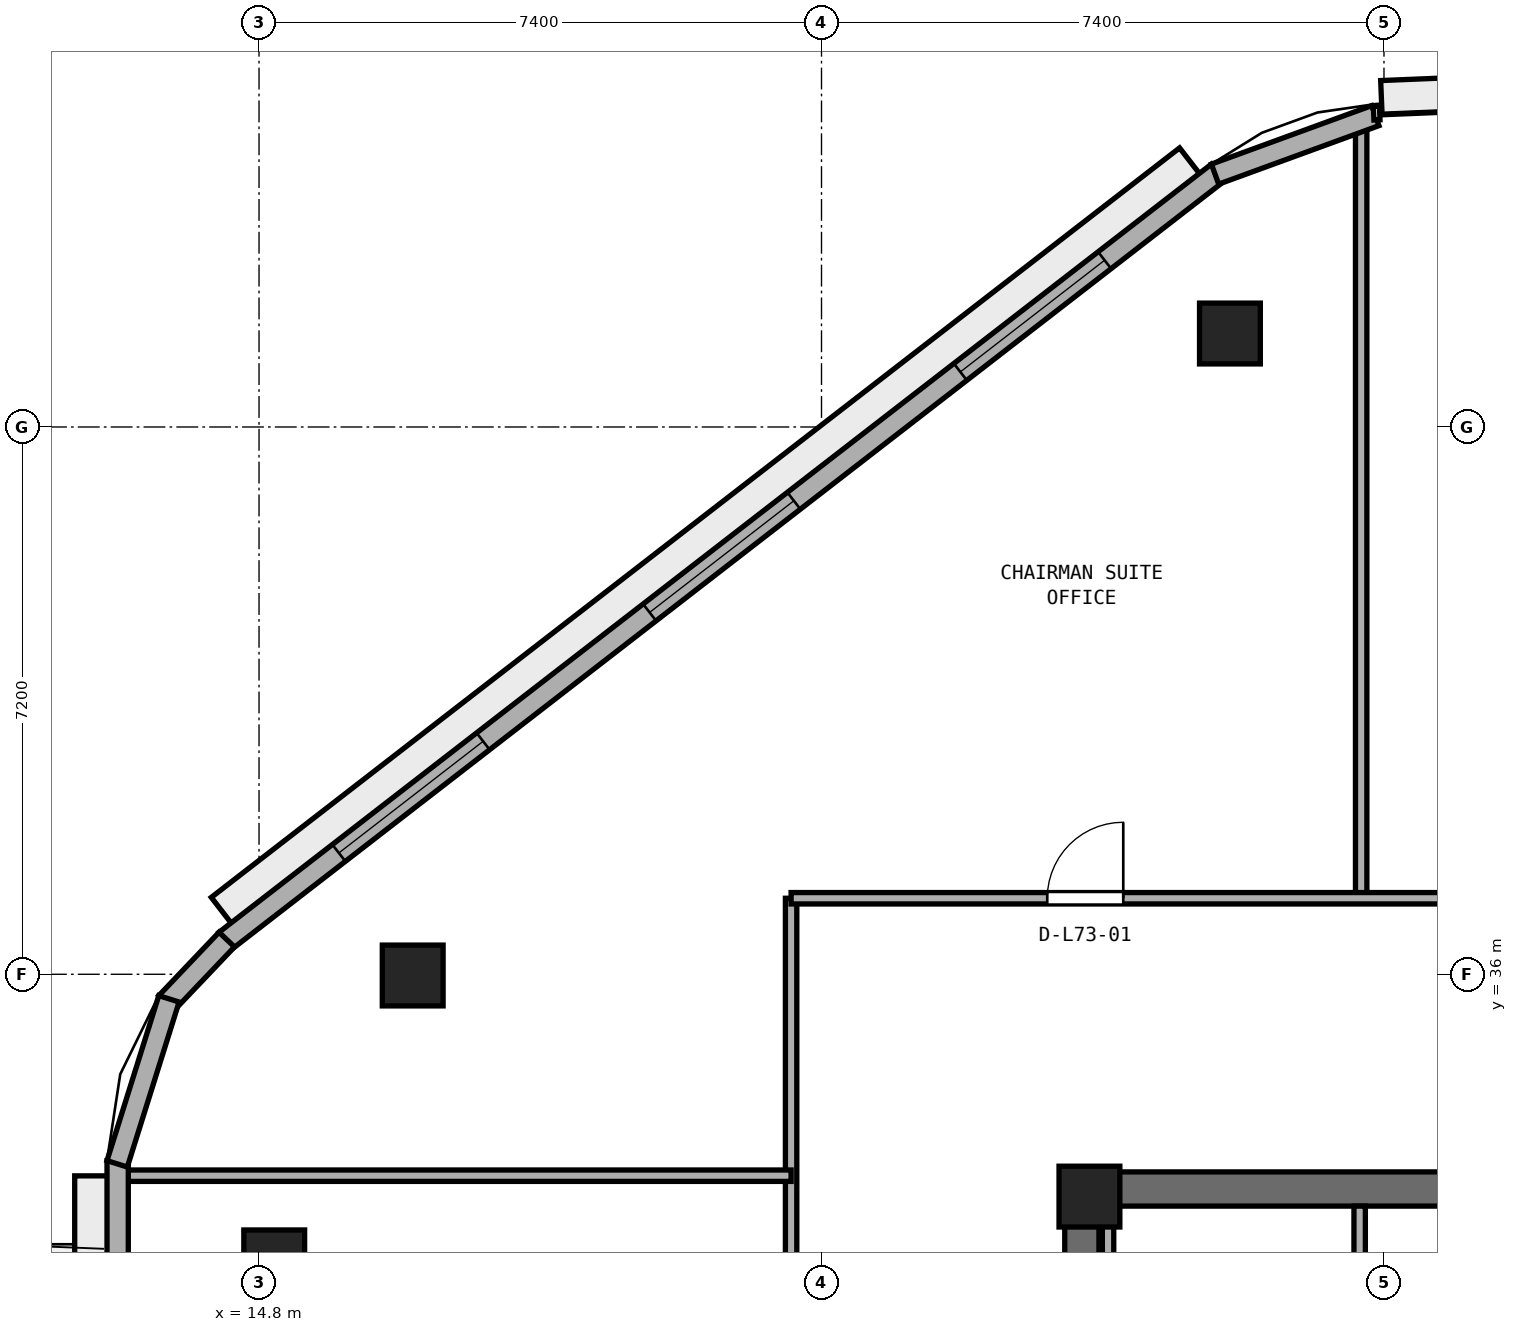
"""IFC4 building model, lengths in metres.
Left out: names, types, materials, properties, quantities, classifications, styles, units other than length and angle.
Written with IfcOpenShell. Run it as: python <this file> out.ifc"""

import sys

from ifc_helpers import new_model, si_unit, direction, frame, frame_2d, origin, origin_2d, place, context, subcontext, project, spatial, rectangle, extrude, element, fill, save


model = new_model("IFC4")
c1 = context("Model", 3, precision=1e-05, world=origin(), true_north=direction((0.0, 1.0)))
c2 = subcontext(c1, "Body", "Model", "MODEL_VIEW")
j1 = project(units=[si_unit("LENGTHUNIT", "METRE"), si_unit("PLANEANGLEUNIT", "RADIAN")], contexts=[c1])
p1 = place(None, origin())
s1 = spatial("IfcSite", under=j1, at=p1, CompositionType="ELEMENT")
p2 = place(p1, origin())
s2 = spatial("IfcBuilding", under=s1, at=p2, CompositionType="ELEMENT")
p3 = place(p2, frame((0.0, 0.0, 285.8)))
s3 = spatial("IfcBuildingStorey", under=s2, at=p3, CompositionType="ELEMENT", Elevation=285.8)
p4 = place(p3, frame((25.4, 33.175, 0.0), z_axis=(0.0, 0.0, 1.0), x_axis=(1.0, 0.0, 0.0)))
e1 = element("IfcWall", 1, at=p4, inside=s3, PredefinedType="SHEAR", context=c2, shape_type="SweptSolid", body=[
    extrude(rectangle(XDim=23.2, YDim=0.45, at=frame_2d((11.6, 0.0))), origin(), (0.0, 0.0, 1.0), 3.54),
])
p5 = place(p3, frame((25.625, 17.45, 0.0), z_axis=(0.0, 0.0, 1.0), x_axis=(0.0, 1.0, 0.0)))
e2 = element("IfcWall", 2, at=p5, inside=s3, PredefinedType="SHEAR", context=c2, shape_type="SweptSolid", body=[
    extrude(rectangle(XDim=15.5, YDim=0.45, at=frame_2d((7.75, 0.0))), origin(), (0.0, 0.0, 1.0), 3.54),
])
p6 = place(p5, frame((7.0, 0.0, 0.0)))
e3 = element("IfcOpeningElement", 3, at=p6, cuts=e2, PredefinedType="OPENING", context=c2, shape_type="SweptSolid", body=[
    extrude(rectangle(XDim=1.5, YDim=2.15, at=frame_2d((0.75, 1.075))), frame((0.0, 0.235, 0.0), z_axis=(0.0, -1.0, 0.0), x_axis=(1.0, 0.0, 0.0)), (0.0, 0.0, 1.0), 0.47),
])
p7 = place(p3, frame((25.725, 33.075, 0.0), z_axis=(0.0, 0.0, 1.0), x_axis=(1.0, 0.0, 0.0)))
e4 = element("IfcColumn", 4, at=p7, inside=s3, PredefinedType="PILASTER", context=c2, shape_type="SweptSolid", body=[
    extrude(rectangle(XDim=0.8, YDim=0.8, at=origin_2d()), origin(), (0.0, 0.0, 1.0), 3.8),
])
for number, where, z_axis, x_axis in (
    (5, (27.573, 44.43, 0.0), (0.0, 0.0, 1.0), (1.0, 0.0, 0.0)),
    (6, (16.822, 35.984, 0.0), (0.0, 0.0, 1.0), (1.0, 0.0, 0.0)),
    (7, (15.0, 32.236, 0.0), (0.0, 0.0, 1.0), (1.0, 0.0, 0.0)),
):
    element("IfcColumn", number, at=place(p3, frame(where, z_axis=z_axis, x_axis=x_axis)), inside=s3, PredefinedType="COLUMN", context=c2, shape_type="SweptSolid", body=[
        extrude(rectangle(XDim=0.8, YDim=0.8, at=origin_2d()), origin(), (0.0, 0.0, 1.0), 3.8),
    ])
p8 = place(p3, frame((25.97, 30.65, 0.0), z_axis=(0.0, 0.0, 1.0), x_axis=(0.0, 1.0, 0.0)))
e8 = element("IfcWall", 8, at=p8, inside=s3, PredefinedType="PARTITIONING", context=c2, shape_type="SweptSolid", body=[
    extrude(rectangle(XDim=2.3, YDim=0.15, at=frame_2d((1.15, 0.0))), origin(), (0.0, 0.0, 1.0), 2.64),
])
p9 = place(p3, frame((29.28, 30.65, 0.0), z_axis=(0.0, 0.0, 1.0), x_axis=(0.0, 1.0, 0.0)))
e9 = element("IfcWall", 9, at=p9, inside=s3, PredefinedType="PARTITIONING", context=c2, shape_type="SweptSolid", body=[
    extrude(rectangle(XDim=2.3, YDim=0.15, at=frame_2d((1.15, 0.0))), origin(), (0.0, 0.0, 1.0), 3.54),
])
p10 = place(p3, frame((29.3, 37.0, 0.0), z_axis=(0.0, 0.0, 1.0), x_axis=(0.0, 1.0, 0.0)))
e10 = element("IfcWall", 10, at=p10, inside=s3, PredefinedType="PARTITIONING", context=c2, shape_type="SweptSolid", body=[
    extrude(rectangle(XDim=10.216, YDim=0.15, at=frame_2d((5.108, 0.0))), origin(), (0.0, 0.0, 1.0), 3.54),
])
p11 = place(p3, frame((21.8, 7.79, 0.0), z_axis=(0.0, 0.0, 1.0), x_axis=(0.0, 1.0, 0.0)))
e11 = element("IfcWall", 11, at=p11, inside=s3, PredefinedType="PARTITIONING", context=c2, shape_type="SweptSolid", body=[
    extrude(rectangle(XDim=29.21, YDim=0.15, at=frame_2d((14.605, 0.0))), origin(), (0.0, 0.0, 1.0), 3.54),
])
p12 = place(p11, frame((9.76, 0.0, 0.0)))
e12 = element("IfcOpeningElement", 12, at=p12, cuts=e11, PredefinedType="OPENING", context=c2, shape_type="SweptSolid", body=[
    extrude(rectangle(XDim=0.9, YDim=2.1, at=frame_2d((0.45, 1.05))), frame((0.0, 0.085, 0.0), z_axis=(0.0, -1.0, 0.0), x_axis=(1.0, 0.0, 0.0)), (0.0, 0.0, 1.0), 0.17),
])
p13 = place(p11, frame((18.11, 0.0, 0.0)))
e13 = element("IfcOpeningElement", 13, at=p13, cuts=e11, PredefinedType="OPENING", context=c2, shape_type="SweptSolid", body=[
    extrude(rectangle(XDim=0.9, YDim=2.1, at=frame_2d((0.45, 1.05))), frame((0.0, 0.085, 0.0), z_axis=(0.0, -1.0, 0.0), x_axis=(1.0, 0.0, 0.0)), (0.0, 0.0, 1.0), 0.17),
])
p14 = place(p11, frame((23.485, 0.0, 0.0)))
e14 = element("IfcOpeningElement", 14, at=p14, cuts=e11, PredefinedType="OPENING", context=c2, shape_type="SweptSolid", body=[
    extrude(rectangle(XDim=0.9, YDim=2.1, at=frame_2d((0.45, 1.05))), frame((0.0, 0.085, 0.0), z_axis=(0.0, -1.0, 0.0), x_axis=(1.0, 0.0, 0.0)), (0.0, 0.0, 1.0), 0.17),
])
p15 = place(p3, frame((13.005, 33.35, 0.0), z_axis=(0.0, 0.0, 1.0), x_axis=(1.0, 0.0, 0.0)))
e15 = element("IfcWall", 15, at=p15, inside=s3, PredefinedType="PARTITIONING", context=c2, shape_type="SweptSolid", body=[
    extrude(rectangle(XDim=8.795, YDim=0.15, at=frame_2d((4.397, 0.0))), origin(), (0.0, 0.0, 1.0), 3.54),
])
p16 = place(p3, frame((21.8, 37.0, 0.0), z_axis=(0.0, 0.0, 1.0), x_axis=(1.0, 0.0, 0.0)))
e16 = element("IfcWall", 16, at=p16, inside=s3, PredefinedType="PARTITIONING", context=c2, shape_type="SweptSolid", body=[
    extrude(rectangle(XDim=13.85, YDim=0.15, at=frame_2d((6.925, 0.0))), origin(), (0.0, 0.0, 1.0), 3.54),
])
p17 = place(p16, frame((3.37, 0.0, 0.0)))
e17 = element("IfcOpeningElement", 17, at=p17, cuts=e16, PredefinedType="OPENING", context=c2, shape_type="SweptSolid", body=[
    extrude(rectangle(XDim=1.0, YDim=2.12, at=frame_2d((0.5, 1.06))), frame((0.0, 0.085, 0.0), z_axis=(0.0, -1.0, 0.0), x_axis=(1.0, 0.0, 0.0)), (0.0, 0.0, 1.0), 0.17),
])
p18 = place(p3, frame((27.415, 46.547, 0.0), z_axis=(0.0, 0.0, 1.0), x_axis=(-0.790789745248, -0.612087884875, 0.0)))
e18 = element("IfcWall", 18, at=p18, inside=s3, PredefinedType="STANDARD", context=c2, shape_type="SweptSolid", body=[
    extrude(rectangle(XDim=16.509, YDim=0.28, at=frame_2d((8.254, 0.0))), origin(), (0.0, 0.0, 1.0), 3.54),
])
p19 = place(p18, frame((1.885, 0.0, 0.9)))
e19 = element("IfcOpeningElement", 19, at=p19, cuts=e18, PredefinedType="OPENING", context=c2, shape_type="SweptSolid", body=[
    extrude(rectangle(XDim=2.4, YDim=1.75, at=frame_2d((1.2, 0.875))), frame((0.0, 0.15, 0.0), z_axis=(0.0, -1.0, 0.0), x_axis=(1.0, 0.0, 0.0)), (0.0, 0.0, 1.0), 0.3),
])
p20 = place(p18, frame((7.055, 0.0, 0.9)))
e20 = element("IfcOpeningElement", 20, at=p20, cuts=e18, PredefinedType="OPENING", context=c2, shape_type="SweptSolid", body=[
    extrude(rectangle(XDim=2.4, YDim=1.75, at=frame_2d((1.2, 0.875))), frame((0.0, 0.15, 0.0), z_axis=(0.0, -1.0, 0.0), x_axis=(1.0, 0.0, 0.0)), (0.0, 0.0, 1.0), 0.3),
])
p21 = place(p18, frame((12.224, 0.0, 0.9)))
e21 = element("IfcOpeningElement", 21, at=p21, cuts=e18, PredefinedType="OPENING", context=c2, shape_type="SweptSolid", body=[
    extrude(rectangle(XDim=2.4, YDim=1.75, at=frame_2d((1.2, 0.875))), frame((0.0, 0.15, 0.0), z_axis=(0.0, -1.0, 0.0), x_axis=(1.0, 0.0, 0.0)), (0.0, 0.0, 1.0), 0.3),
])
p22 = place(p3, frame((12.94, 33.548, 0.0), z_axis=(0.0, 0.0, 1.0), x_axis=(0.0, -1.0, 0.0)))
e22 = element("IfcWall", 22, at=p22, inside=s3, PredefinedType="STANDARD", context=c2, shape_type="SweptSolid", body=[
    extrude(rectangle(XDim=17.496, YDim=0.28, at=frame_2d((8.748, 0.0))), origin(), (0.0, 0.0, 1.0), 3.54),
])
p23 = place(p22, frame((8.198, 0.0, 0.0)))
e23 = element("IfcOpeningElement", 23, at=p23, cuts=e22, PredefinedType="OPENING", context=c2, shape_type="SweptSolid", body=[
    extrude(rectangle(XDim=1.1, YDim=2.2, at=frame_2d((0.55, 1.1))), frame((0.0, 0.15, 0.0), z_axis=(0.0, -1.0, 0.0), x_axis=(1.0, 0.0, 0.0)), (0.0, 0.0, 1.0), 0.3),
])
p24 = place(p22, frame((13.047, 0.0, 0.9)))
e24 = element("IfcOpeningElement", 24, at=p24, cuts=e22, PredefinedType="OPENING", context=c2, shape_type="SweptSolid", body=[
    extrude(rectangle(XDim=2.4, YDim=1.75, at=frame_2d((1.2, 0.875))), frame((0.0, 0.15, 0.0), z_axis=(0.0, -1.0, 0.0), x_axis=(1.0, 0.0, 0.0)), (0.0, 0.0, 1.0), 0.3),
])
p25 = place(p3, frame((29.486, 47.296, 0.0), z_axis=(0.0, 0.0, 1.0), x_axis=(-0.939434048497, -0.342729731019, 0.0)))
e25 = element("IfcWall", 25, at=p25, inside=s3, PredefinedType="STANDARD", context=c2, shape_type="SweptSolid", body=[
    extrude(rectangle(XDim=2.245, YDim=0.28, at=frame_2d((1.122, 0.0))), origin(), (0.0, 0.0, 1.0), 3.54),
])
p26 = place(p3, frame((14.375, 36.457, 0.0), z_axis=(0.0, 0.0, 1.0), x_axis=(-0.68895569752, -0.724803453948, 0.0)))
e26 = element("IfcWall", 26, at=p26, inside=s3, PredefinedType="STANDARD", context=c2, shape_type="SweptSolid", body=[
    extrude(rectangle(XDim=1.151, YDim=0.28, at=frame_2d((0.575, 0.0))), origin(), (0.0, 0.0, 1.0), 3.54),
])
p27 = place(p3, frame((13.615, 35.677, 0.0), z_axis=(0.0, 0.0, 1.0), x_axis=(-0.299374552426, -0.954135670311, 0.0)))
e27 = element("IfcWall", 27, at=p27, inside=s3, PredefinedType="STANDARD", context=c2, shape_type="SweptSolid", body=[
    extrude(rectangle(XDim=2.275, YDim=0.28, at=frame_2d((1.138, 0.0))), origin(), (0.0, 0.0, 1.0), 3.54),
])
p28 = place(p17, origin())
e28 = element("IfcDoor", 28, at=p28, inside=s3, OperationType="SINGLE_SWING_RIGHT", PredefinedType="DOOR", context=c2, shape_type="SweptSolid", body=[
    extrude(rectangle(XDim=1.0, YDim=2.12, at=frame_2d((0.5, 1.06))), frame((0.0, 0.025, 0.0), z_axis=(0.0, -1.0, 0.0), x_axis=(1.0, 0.0, 0.0)), (0.0, 0.0, 1.0), 0.05),
])
fill(e17, e28)
p29 = place(p19, origin())
e29 = element("IfcWindow", 29, at=p29, inside=s3, PartitioningType="SINGLE_PANEL", PredefinedType="WINDOW", context=c2, shape_type="SweptSolid", body=[
    extrude(rectangle(XDim=2.4, YDim=1.75, at=frame_2d((1.2, 0.875))), frame((0.0, 0.03, 0.0), z_axis=(0.0, -1.0, 0.0), x_axis=(1.0, 0.0, 0.0)), (0.0, 0.0, 1.0), 0.06),
])
fill(e19, e29)
p30 = place(p20, origin())
e30 = element("IfcWindow", 30, at=p30, inside=s3, PartitioningType="SINGLE_PANEL", PredefinedType="WINDOW", context=c2, shape_type="SweptSolid", body=[
    extrude(rectangle(XDim=2.4, YDim=1.75, at=frame_2d((1.2, 0.875))), frame((0.0, 0.03, 0.0), z_axis=(0.0, -1.0, 0.0), x_axis=(1.0, 0.0, 0.0)), (0.0, 0.0, 1.0), 0.06),
])
fill(e20, e30)
p31 = place(p21, origin())
e31 = element("IfcWindow", 31, at=p31, inside=s3, PartitioningType="SINGLE_PANEL", PredefinedType="WINDOW", context=c2, shape_type="SweptSolid", body=[
    extrude(rectangle(XDim=2.4, YDim=1.75, at=frame_2d((1.2, 0.875))), frame((0.0, 0.03, 0.0), z_axis=(0.0, -1.0, 0.0), x_axis=(1.0, 0.0, 0.0)), (0.0, 0.0, 1.0), 0.06),
])
fill(e21, e31)
save(model, sys.argv[1])
